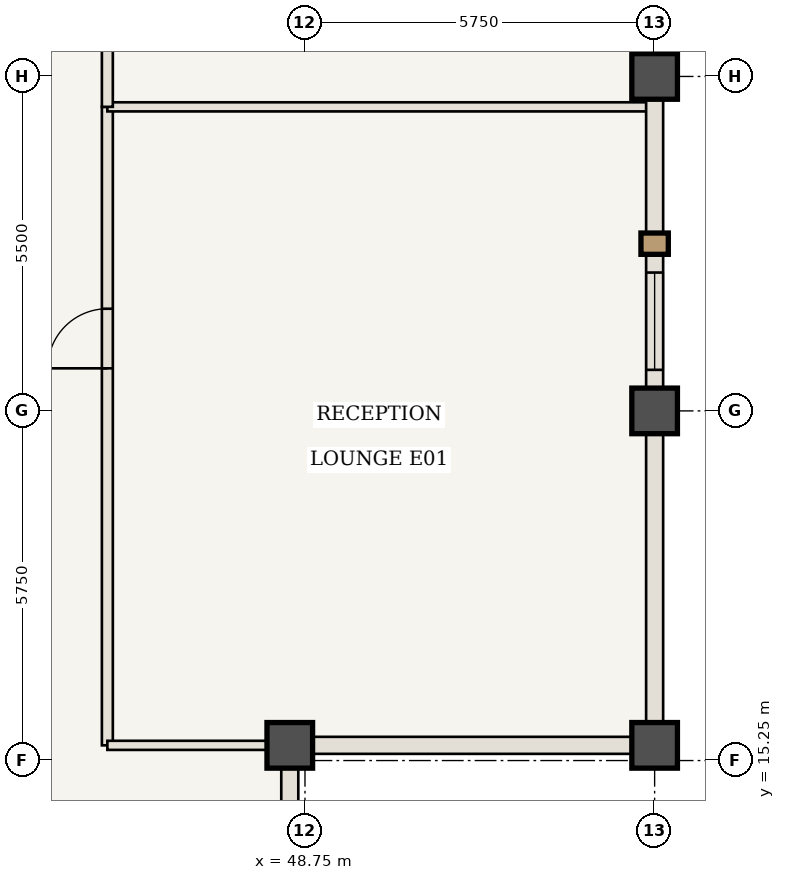
"""IFC4 building model, lengths in metres.
Left out: names, types, materials, properties, quantities, classifications, styles, units other than length and angle.
Written with IfcOpenShell. Run it as: python <this file> out.ifc"""

import sys

from ifc_helpers import new_model, si_unit, direction, frame, frame_2d, origin, origin_2d, place, context, subcontext, project, spatial, rectangle, extrude, element, fill, save


model = new_model("IFC4")
c1 = context("Model", 3, precision=1e-05, world=origin(), true_north=direction((0.0, 1.0)))
c2 = subcontext(c1, "Body", "Model", "MODEL_VIEW")
j1 = project(units=[si_unit("LENGTHUNIT", "METRE"), si_unit("PLANEANGLEUNIT", "RADIAN")], contexts=[c1])
p1 = place(None, origin())
s1 = spatial("IfcSite", under=j1, at=p1, CompositionType="ELEMENT")
p2 = place(p1, origin())
s2 = spatial("IfcBuilding", under=s1, at=p2, CompositionType="ELEMENT")
p3 = place(p2, frame((0.0, 0.0, 266.0)))
s3 = spatial("IfcBuildingStorey", under=s2, at=p3, CompositionType="ELEMENT", Elevation=266.0)
for number, where, z_axis, x_axis in (
    (1, (48.5, 15.5, 0.0), (0.0, 0.0, 1.0), (1.0, 0.0, 0.0)),
    (2, (54.5, 15.5, 0.0), (0.0, 0.0, 1.0), (1.0, 0.0, 0.0)),
    (3, (54.5, 21.0, 0.0), (0.0, 0.0, 1.0), (1.0, 0.0, 0.0)),
    (4, (54.5, 26.5, 0.0), (0.0, 0.0, 1.0), (1.0, 0.0, 0.0)),
):
    element("IfcColumn", number, at=place(p3, frame(where, z_axis=z_axis, x_axis=x_axis)), inside=s3, PredefinedType="COLUMN", context=c2, shape_type="SweptSolid", body=[
        extrude(rectangle(XDim=0.75, YDim=0.75, at=origin_2d()), origin(), (0.0, 0.0, 1.0), 3.85),
    ])
p4 = place(p3, frame((45.5, 15.5, 0.0), z_axis=(0.0, 0.0, 1.0), x_axis=(0.0, 1.0, 0.0)))
e5 = element("IfcWall", 5, at=p4, inside=s3, PredefinedType="STANDARD", context=c2, shape_type="SweptSolid", body=[
    extrude(rectangle(XDim=10.5, YDim=0.18, at=frame_2d((5.25, 0.0))), origin(), (0.0, 0.0, 1.0), 3.685),
])
p5 = place(p4, frame((6.2, 0.0, 0.0)))
e6 = element("IfcOpeningElement", 6, at=p5, cuts=e5, PredefinedType="OPENING", context=c2, shape_type="SweptSolid", body=[
    extrude(rectangle(XDim=0.98, YDim=2.2, at=frame_2d((0.49, 1.1))), frame((0.0, 0.1, 0.0), z_axis=(0.0, -1.0, 0.0), x_axis=(1.0, 0.0, 0.0)), (0.0, 0.0, 1.0), 0.2),
])
p6 = place(p3, frame((45.5, 26.0, 0.0), z_axis=(0.0, 0.0, 1.0), x_axis=(1.0, 0.0, 0.0)))
e7 = element("IfcWall", 7, at=p6, inside=s3, PredefinedType="STANDARD", context=c2, shape_type="SweptSolid", body=[
    extrude(rectangle(XDim=8.94, YDim=0.15, at=frame_2d((4.47, 0.0))), origin(), (0.0, 0.0, 1.0), 3.685),
])
p7 = place(p3, frame((45.5, 26.0, 0.0), z_axis=(0.0, 0.0, 1.0), x_axis=(0.0, 1.0, 0.0)))
e8 = element("IfcWall", 8, at=p7, inside=s3, PredefinedType="STANDARD", context=c2, shape_type="SweptSolid", body=[
    extrude(rectangle(XDim=12.0, YDim=0.18, at=frame_2d((6.0, 0.0))), origin(), (0.0, 0.0, 1.0), 3.685),
])
p8 = place(p7, frame((6.95, 0.0, 0.0)))
e9 = element("IfcOpeningElement", 9, at=p8, cuts=e8, PredefinedType="OPENING", context=c2, shape_type="SweptSolid", body=[
    extrude(rectangle(XDim=0.98, YDim=2.2, at=frame_2d((0.49, 1.1))), frame((0.0, 0.1, 0.0), z_axis=(0.0, -1.0, 0.0), x_axis=(1.0, 0.0, 0.0)), (0.0, 0.0, 1.0), 0.2),
])
p9 = place(p3, frame((45.5, 15.5, 0.0), z_axis=(0.0, 0.0, 1.0), x_axis=(1.0, 0.0, 0.0)))
e10 = element("IfcWall", 10, at=p9, inside=s3, PredefinedType="STANDARD", context=c2, shape_type="SweptSolid", body=[
    extrude(rectangle(XDim=3.0, YDim=0.15, at=frame_2d((1.5, 0.0))), origin(), (0.0, 0.0, 1.0), 3.685),
])
p10 = place(p3, frame((54.5, 21.0, 0.0), z_axis=(0.0, 0.0, 1.0), x_axis=(0.0, -1.0, 0.0)))
e11 = element("IfcWall", 11, at=p10, inside=s3, PredefinedType="USERDEFINED", context=c2, shape_type="SweptSolid", body=[
    extrude(rectangle(XDim=5.5, YDim=0.28, at=frame_2d((2.75, 0.0))), origin(), (0.0, 0.0, 1.0), 2.985),
])
p11 = place(p3, frame((54.5, 26.5, 0.0), z_axis=(0.0, 0.0, 1.0), x_axis=(0.0, -1.0, 0.0)))
e12 = element("IfcWall", 12, at=p11, inside=s3, PredefinedType="USERDEFINED", context=c2, shape_type="SweptSolid", body=[
    extrude(rectangle(XDim=5.5, YDim=0.28, at=frame_2d((2.75, 0.0))), origin(), (0.0, 0.0, 1.0), 2.985),
])
p12 = place(p11, frame((3.225, 0.0, 0.85)))
e13 = element("IfcOpeningElement", 13, at=p12, cuts=e12, PredefinedType="OPENING", context=c2, shape_type="SweptSolid", body=[
    extrude(rectangle(XDim=1.6, YDim=1.935, at=frame_2d((0.8, 0.968))), frame((0.0, 0.15, 0.0), z_axis=(0.0, -1.0, 0.0), x_axis=(1.0, 0.0, 0.0)), (0.0, 0.0, 1.0), 0.3),
])
p13 = place(p3, frame((54.5, 32.0, 0.0), z_axis=(0.0, 0.0, 1.0), x_axis=(0.0, -1.0, 0.0)))
e14 = element("IfcWall", 14, at=p13, inside=s3, PredefinedType="USERDEFINED", context=c2, shape_type="SweptSolid", body=[
    extrude(rectangle(XDim=5.5, YDim=0.28, at=frame_2d((2.75, 0.0))), origin(), (0.0, 0.0, 1.0), 2.985),
])
p14 = place(p13, frame((1.5, 0.0, 0.85)))
e15 = element("IfcOpeningElement", 15, at=p14, cuts=e14, PredefinedType="OPENING", context=c2, shape_type="SweptSolid", body=[
    extrude(rectangle(XDim=2.5, YDim=1.935, at=frame_2d((1.25, 0.968))), frame((0.0, 0.15, 0.0), z_axis=(0.0, -1.0, 0.0), x_axis=(1.0, 0.0, 0.0)), (0.0, 0.0, 1.0), 0.3),
])
for number, where, z_axis, x_axis in (
    (16, (48.5, 15.5, 0.0), (0.0, 0.0, 1.0), (0.0, -1.0, 0.0)),
    (17, (54.5, 15.5, 0.0), (0.0, 0.0, 1.0), (-1.0, 0.0, 0.0)),
):
    element("IfcWall", number, at=place(p3, frame(where, z_axis=z_axis, x_axis=x_axis)), inside=s3, PredefinedType="USERDEFINED", context=c2, shape_type="SweptSolid", body=[
        extrude(rectangle(XDim=6.0, YDim=0.28, at=frame_2d((3.0, 0.0))), origin(), (0.0, 0.0, 1.0), 2.985),
    ])
p15 = place(p5, origin())
e18 = element("IfcDoor", 18, at=p15, inside=s3, OperationType="SINGLE_SWING_LEFT", PredefinedType="DOOR", context=c2, shape_type="SweptSolid", body=[
    extrude(rectangle(XDim=0.98, YDim=2.2, at=frame_2d((0.49, 1.1))), frame((0.0, 0.025, 0.0), z_axis=(0.0, -1.0, 0.0), x_axis=(1.0, 0.0, 0.0)), (0.0, 0.0, 1.0), 0.05),
])
fill(e6, e18)
p16 = place(p12, origin())
e19 = element("IfcWindow", 19, at=p16, inside=s3, PartitioningType="SINGLE_PANEL", PredefinedType="WINDOW", context=c2, shape_type="SweptSolid", body=[
    extrude(rectangle(XDim=1.6, YDim=1.935, at=frame_2d((0.8, 0.968))), frame((0.0, 0.03, 0.0), z_axis=(0.0, -1.0, 0.0), x_axis=(1.0, 0.0, 0.0)), (0.0, 0.0, 1.0), 0.06),
])
fill(e13, e19)
save(model, sys.argv[1])
